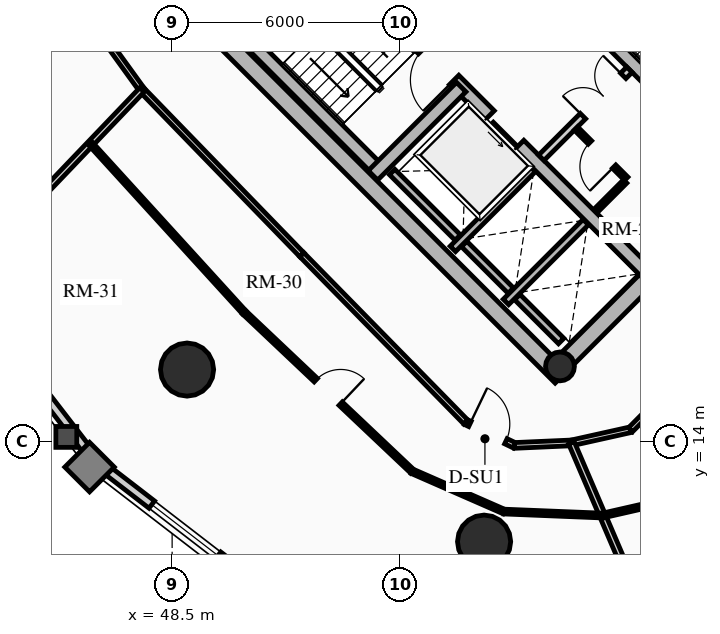
"""IFC4 building model, lengths in metres.
Left out: names, types, materials, properties, quantities, classifications, styles, units other than length and angle.
Written with IfcOpenShell. Run it as: python <this file> out.ifc"""

import sys

from ifc_helpers import new_model, si_unit, direction, frame, frame_2d, origin, origin_2d, place, context, subcontext, project, spatial, rectangle, circle, hollow_circle, extrude, source, transform, mapped, element, fill, save


model = new_model("IFC4")
c1 = context("Model", 3, precision=1e-05, world=origin(), true_north=direction((0.0, 1.0)))
c2 = subcontext(c1, "Body", "Model", "MODEL_VIEW")
j1 = project(units=[si_unit("LENGTHUNIT", "METRE"), si_unit("PLANEANGLEUNIT", "RADIAN")], contexts=[c1])
p1 = place(None, origin())
s1 = spatial("IfcSite", under=j1, at=p1, CompositionType="ELEMENT")
p2 = place(p1, origin())
s2 = spatial("IfcBuilding", under=s1, at=p2, CompositionType="ELEMENT")
p3 = place(p2, frame((0.0, 0.0, 110.89)))
s3 = spatial("IfcBuildingStorey", under=s2, at=p3, CompositionType="ELEMENT", Elevation=110.89)
for number, where, z_axis, x_axis in (
    (1, (58.737, 15.697, 0.0), (0.0, 0.0, 1.0), (-0.707, 0.707, 0.0)),
    (2, (66.303, 23.263, 0.0), (0.0, 0.0, 1.0), (-0.707, 0.707, 0.0)),
):
    element("IfcWall", number, at=place(p3, frame(where, z_axis=z_axis, x_axis=x_axis)), inside=s3, PredefinedType="SHEAR", context=c2, shape_type="SweptSolid", body=[
        extrude(rectangle(XDim=14.2, YDim=0.45, at=frame_2d((7.1, 0.0))), origin(), (0.0, 0.0, 1.0), 2.91),
    ])
p4 = place(p3, frame((58.578, 15.856, 0.0), z_axis=(0.0, 0.0, 1.0), x_axis=(0.707106781187, 0.707106781187, 0.0)))
e3 = element("IfcWall", 3, at=p4, inside=s3, PredefinedType="SHEAR", context=c2, shape_type="SweptSolid", body=[
    extrude(rectangle(XDim=10.7, YDim=0.45, at=frame_2d((5.35, 0.0))), origin(), (0.0, 0.0, 1.0), 2.91),
])
m1 = source(origin(), c2, "Body", "SweptSolid", [
    extrude(rectangle(XDim=1.5, YDim=2.02, at=frame_2d((0.75, 1.01))), frame((0.0, 0.235, 0.0), z_axis=(0.0, -1.0, 0.0), x_axis=(1.0, 0.0, 0.0)), (0.0, 0.0, 1.0), 0.47),
])
p5 = place(p4, frame((5.45, 0.0, 0.0)))
e4 = element("IfcOpeningElement", 4, at=p5, cuts=e3, PredefinedType="OPENING", context=c2, shape_type="MappedRepresentation", body=[
    mapped(m1, transform((0.0, 0.0, 0.0), x_axis=(1.0, 0.0, 0.0), y_axis=(0.0, 1.0, 0.0), z_axis=(0.0, 0.0, 1.0), scale=1.0)),
])
p6 = place(p3, frame((61.078, 18.355, 0.0), z_axis=(0.0, 0.0, 1.0), x_axis=(-0.707106781187, 0.707106781187, 0.0)))
e5 = element("IfcWall", 5, at=p6, inside=s3, PredefinedType="SHEAR", context=c2, shape_type="SweptSolid", body=[
    extrude(rectangle(XDim=13.75, YDim=0.35, at=frame_2d((6.875, 0.0))), origin(), (0.0, 0.0, 1.0), 2.91),
])
m2 = source(origin(), c2, "Body", "SweptSolid", [
    extrude(rectangle(XDim=1.1, YDim=2.015, at=frame_2d((0.55, 1.007))), frame((0.0, 0.185, 0.0), z_axis=(0.0, -1.0, 0.0), x_axis=(1.0, 0.0, 0.0)), (0.0, 0.0, 1.0), 0.37),
])
p7 = place(p6, frame((4.875, 0.0, 0.0)))
e6 = element("IfcOpeningElement", 6, at=p7, cuts=e5, PredefinedType="OPENING", context=c2, shape_type="MappedRepresentation", body=[
    mapped(m2, transform((0.0, 0.0, 0.0), x_axis=(1.0, 0.0, 0.0), y_axis=(0.0, 1.0, 0.0), z_axis=(0.0, 0.0, 1.0), scale=1.0)),
])
m3 = source(origin(), c2, "Body", "SweptSolid", [
    extrude(rectangle(XDim=1.15, YDim=2.02, at=frame_2d((0.575, 1.01))), frame((0.0, 0.185, 0.0), z_axis=(0.0, -1.0, 0.0), x_axis=(1.0, 0.0, 0.0)), (0.0, 0.0, 1.0), 0.37),
])
p8 = place(p6, frame((7.295, 0.0, 0.0)))
e7 = element("IfcOpeningElement", 7, at=p8, cuts=e5, PredefinedType="OPENING", context=c2, shape_type="MappedRepresentation", body=[
    mapped(m3, transform((0.0, 0.0, 0.0), x_axis=(1.0, 0.0, 0.0), y_axis=(0.0, 1.0, 0.0), z_axis=(0.0, 0.0, 1.0), scale=1.0)),
])
p9 = place(p3, frame((63.645, 20.922, 0.0), z_axis=(0.0, 0.0, 1.0), x_axis=(-0.707106781187, 0.707106781187, 0.0)))
e8 = element("IfcWall", 8, at=p9, inside=s3, PredefinedType="SHEAR", context=c2, shape_type="SweptSolid", body=[
    extrude(rectangle(XDim=13.75, YDim=0.35, at=frame_2d((6.875, 0.0))), origin(), (0.0, 0.0, 1.0), 2.91),
])
p10 = place(p9, frame((10.0, 0.0, 0.0)))
e9 = element("IfcOpeningElement", 9, at=p10, cuts=e8, PredefinedType="OPENING", context=c2, shape_type="MappedRepresentation", body=[
    mapped(m2, transform((0.0, 0.0, 0.0), x_axis=(1.0, 0.0, 0.0), y_axis=(0.0, 1.0, 0.0), z_axis=(0.0, 0.0, 1.0), scale=1.0)),
])
p11 = place(p9, frame((12.0, 0.0, 0.0)))
e10 = element("IfcOpeningElement", 10, at=p11, cuts=e8, PredefinedType="OPENING", context=c2, shape_type="MappedRepresentation", body=[
    mapped(m2, transform((0.0, 0.0, 0.0), x_axis=(1.0, 0.0, 0.0), y_axis=(0.0, 1.0, 0.0), z_axis=(0.0, 0.0, 1.0), scale=1.0)),
])
p12 = place(p9, frame((5.305, 0.0, 0.0)))
e11 = element("IfcOpeningElement", 11, at=p12, cuts=e8, PredefinedType="OPENING", context=c2, shape_type="MappedRepresentation", body=[
    mapped(m3, transform((0.0, 0.0, 0.0), x_axis=(1.0, 0.0, 0.0), y_axis=(0.0, 1.0, 0.0), z_axis=(0.0, 0.0, 1.0), scale=1.0)),
])
p13 = place(p3, frame((53.922, 21.141, 0.0), z_axis=(0.0, 0.0, 1.0), x_axis=(-0.707088616009, 0.707124945897, 0.0)))
e12 = element("IfcWall", 12, at=p13, inside=s3, PredefinedType="SHEAR", context=c2, shape_type="SweptSolid", body=[
    extrude(rectangle(XDim=6.72, YDim=0.35, at=frame_2d((3.36, 0.0))), origin(), (0.0, 0.0, 1.0), 2.91),
])
p14 = place(p3, frame((53.784, 21.003, 0.0), z_axis=(0.0, 0.0, 1.0), x_axis=(0.707106781187, 0.707106781187, 0.0)))
e13 = element("IfcWall", 13, at=p14, inside=s3, PredefinedType="SHEAR", context=c2, shape_type="SweptSolid", body=[
    extrude(rectangle(XDim=3.285, YDim=0.35, at=frame_2d((1.643, 0.0))), origin(), (0.0, 0.0, 1.0), 2.91),
])
p15 = place(p3, frame((58.706, 15.976, 0.0), z_axis=(0.0, 0.0, 1.0), x_axis=(0.707106781187, 0.707106781187, 0.0)))
e14 = element("IfcColumn", 14, at=p15, inside=s3, PredefinedType="COLUMN", context=c2, shape_type="SweptSolid", body=[
    extrude(hollow_circle(Radius=0.38, WallThickness=0.032, at=origin_2d()), origin(), (0.0, 0.0, 1.0), 2.91),
])
for number, where, z_axis, x_axis in (
    (15, (48.893, 15.893, 0.0), (0.0, 0.0, 1.0), (1.0, 0.0, 0.0)),
    (16, (56.709, 11.365, 0.0), (0.0, 0.0, 1.0), (1.0, 0.0, 0.0)),
):
    element("IfcColumn", number, at=place(p3, frame(where, z_axis=z_axis, x_axis=x_axis)), inside=s3, PredefinedType="USERDEFINED", context=c2, shape_type="SweptSolid", body=[
        extrude(circle(Radius=0.7, at=origin_2d()), origin(), (0.0, 0.0, 1.0), 2.91),
    ])
p16 = place(p3, frame((46.483, 13.483, 0.0), z_axis=(0.0, 0.0, 1.0), x_axis=(-0.61054437102, 0.791982052206, 0.0)))
e17 = element("IfcWall", 17, at=p16, inside=s3, PredefinedType="SOLIDWALL", context=c2, shape_type="SweptSolid", body=[
    extrude(rectangle(XDim=5.942, YDim=0.24, at=frame_2d((2.971, 0.0))), origin(), (0.0, 0.0, 1.0), 2.179),
])
p17 = place(p3, frame((51.189, 9.855, 0.0), z_axis=(0.0, 0.0, 1.0), x_axis=(-0.791982052206, 0.61054437102, 0.0)))
e18 = element("IfcWall", 18, at=p17, inside=s3, PredefinedType="SOLIDWALL", context=c2, shape_type="SweptSolid", body=[
    extrude(rectangle(XDim=5.942, YDim=0.24, at=frame_2d((2.971, 0.0))), origin(), (0.0, 0.0, 1.0), 2.179),
])
m4 = source(origin(), c2, "Body", "SweptSolid", [
    extrude(rectangle(XDim=2.2, YDim=1.35, at=frame_2d((1.1, 0.675))), frame((0.0, 0.13, 0.0), z_axis=(0.0, -1.0, 0.0), x_axis=(1.0, 0.0, 0.0)), (0.0, 0.0, 1.0), 0.26),
])
p18 = place(p17, frame((1.871, 0.0, 0.65)))
e19 = element("IfcOpeningElement", 19, at=p18, cuts=e18, PredefinedType="OPENING", context=c2, shape_type="MappedRepresentation", body=[
    mapped(m4, transform((0.0, 0.0, 0.0), x_axis=(1.0, 0.0, 0.0), y_axis=(0.0, 1.0, 0.0), z_axis=(0.0, 0.0, 1.0), scale=1.0)),
])
p19 = place(p3, frame((55.888, 19.069, 0.0), z_axis=(0.0, 0.0, 1.0), x_axis=(0.707106781187, 0.707106781187, 0.0)))
e20 = element("IfcWall", 20, at=p19, inside=s3, PredefinedType="SHEAR", context=c2, shape_type="SweptSolid", body=[
    extrude(rectangle(XDim=2.97, YDim=0.2, at=frame_2d((1.485, 0.0))), origin(), (0.0, 0.0, 1.0), 2.91),
])
p20 = place(p3, frame((56.015, 19.366, 0.0), z_axis=(0.0, 0.0, 1.0), x_axis=(-0.707106781187, 0.707106781187, 0.0)))
e21 = element("IfcWall", 21, at=p20, inside=s3, PredefinedType="SHEAR", context=c2, shape_type="SweptSolid", body=[
    extrude(rectangle(XDim=2.44, YDim=0.2, at=frame_2d((1.22, 0.0))), origin(), (0.0, 0.0, 1.0), 2.91),
])
p21 = place(p3, frame((57.284, 17.673, 0.0), z_axis=(0.0, 0.0, 1.0), x_axis=(0.707147878904, 0.70706568108, 0.0)))
e22 = element("IfcWall", 22, at=p21, inside=s3, PredefinedType="SHEAR", context=c2, shape_type="SweptSolid", body=[
    extrude(rectangle(XDim=2.97, YDim=0.2, at=frame_2d((1.485, 0.0))), origin(), (0.0, 0.0, 1.0), 2.91),
])
p22 = place(p3, frame((57.412, 17.97, 0.0), z_axis=(0.0, 0.0, 1.0), x_axis=(-0.707106781187, 0.707106781187, 0.0)))
e23 = element("IfcWall", 23, at=p22, inside=s3, PredefinedType="SHEAR", context=c2, shape_type="SweptSolid", body=[
    extrude(rectangle(XDim=1.735, YDim=0.2, at=frame_2d((0.867, 0.0))), origin(), (0.0, 0.0, 1.0), 2.91),
])
p23 = place(p3, frame((58.737, 16.644, 0.0), z_axis=(0.0, 0.0, 1.0), x_axis=(-0.707032117043, 0.707181437447, 0.0)))
e24 = element("IfcWall", 24, at=p23, inside=s3, PredefinedType="SHEAR", context=c2, shape_type="SweptSolid", body=[
    extrude(rectangle(XDim=1.635, YDim=0.2, at=frame_2d((0.817, 0.0))), origin(), (0.0, 0.0, 1.0), 2.91),
])
p24 = place(p3, frame((58.214, 21.467, 0.0), z_axis=(0.0, 0.0, 1.0), x_axis=(0.707106781187, 0.707106781187, 0.0)))
e25 = element("IfcWall", 25, at=p24, inside=s3, PredefinedType="PARTITIONING", context=c2, shape_type="SweptSolid", body=[
    extrude(rectangle(XDim=3.28, YDim=0.2, at=frame_2d((1.64, 0.0))), origin(), (0.0, 0.0, 1.0), 2.655),
])
m5 = source(origin(), c2, "Body", "SweptSolid", [
    extrude(rectangle(XDim=1.5, YDim=2.02, at=frame_2d((0.75, 1.01))), frame((0.0, 0.11, 0.0), z_axis=(0.0, -1.0, 0.0), x_axis=(1.0, 0.0, 0.0)), (0.0, 0.0, 1.0), 0.22),
])
p25 = place(p24, frame((1.55, 0.0, 0.0)))
e26 = element("IfcOpeningElement", 26, at=p25, cuts=e25, PredefinedType="OPENING", context=c2, shape_type="MappedRepresentation", body=[
    mapped(m5, transform((0.0, 0.0, 0.0), x_axis=(1.0, 0.0, 0.0), y_axis=(0.0, 1.0, 0.0), z_axis=(0.0, 0.0, 1.0), scale=1.0)),
])
p26 = place(p3, frame((60.448, 20.915, 0.0), z_axis=(0.0, 0.0, 1.0), x_axis=(-0.707106781187, 0.707106781187, 0.0)))
e27 = element("IfcWall", 27, at=p26, inside=s3, PredefinedType="PARTITIONING", context=c2, shape_type="SweptSolid", body=[
    extrude(rectangle(XDim=1.87, YDim=0.125, at=frame_2d((0.935, 0.0))), origin(), (0.0, 0.0, 1.0), 2.655),
])
m6 = source(origin(), c2, "Body", "SweptSolid", [
    extrude(rectangle(XDim=0.9, YDim=2.005, at=frame_2d((0.45, 1.002))), frame((0.0, 0.073, 0.0), z_axis=(0.0, -1.0, 0.0), x_axis=(1.0, 0.0, 0.0)), (0.0, 0.0, 1.0), 0.145),
])
p27 = place(p26, frame((0.45, 0.0, 0.0)))
e28 = element("IfcOpeningElement", 28, at=p27, cuts=e27, PredefinedType="OPENING", context=c2, shape_type="MappedRepresentation", body=[
    mapped(m6, transform((0.0, 0.0, 0.0), x_axis=(1.0, 0.0, 0.0), y_axis=(0.0, 1.0, 0.0), z_axis=(0.0, 0.0, 1.0), scale=1.0)),
])
p28 = place(p3, frame((59.643, 20.066, 0.0), z_axis=(0.0, 0.0, 1.0), x_axis=(0.707106781187, 0.707106781187, 0.0)))
e29 = element("IfcWall", 29, at=p28, inside=s3, PredefinedType="PARTITIONING", context=c2, shape_type="SweptSolid", body=[
    extrude(rectangle(XDim=1.1, YDim=0.125, at=frame_2d((0.55, 0.0))), origin(), (0.0, 0.0, 1.0), 2.655),
])
p29 = place(p3, frame((46.795, 24.513, 0.0), z_axis=(0.0, 0.0, 1.0), x_axis=(0.585628197524, -0.810579801294, 0.0)))
e30 = element("IfcWall", 30, at=p29, inside=s3, PredefinedType="PARTITIONING", context=c2, shape_type="SweptSolid", body=[
    extrude(rectangle(XDim=1.554, YDim=0.15, at=frame_2d((0.777, 0.0))), origin(), (0.0, 0.0, 1.0), 2.225),
])
p30 = place(p3, frame((47.706, 23.253, 0.0), z_axis=(0.0, 0.0, 1.0), x_axis=(0.696179266346, -0.717867974707, 0.0)))
e31 = element("IfcWall", 31, at=p30, inside=s3, PredefinedType="PARTITIONING", context=c2, shape_type="SweptSolid", body=[
    extrude(rectangle(XDim=6.045, YDim=0.15, at=frame_2d((3.022, 0.0))), origin(), (0.0, 0.0, 1.0), 2.655),
])
p31 = place(p3, frame((51.914, 18.914, 0.0), z_axis=(0.0, 0.0, 1.0), x_axis=(0.699999313799, -0.714143515465, 0.0)))
e32 = element("IfcWall", 32, at=p31, inside=s3, PredefinedType="PARTITIONING", context=c2, shape_type="SweptSolid", body=[
    extrude(rectangle(XDim=6.162, YDim=0.15, at=frame_2d((3.081, 0.0))), origin(), (0.0, 0.0, 1.0), 2.225),
])
p32 = place(p3, frame((56.227, 14.513, 0.0), z_axis=(0.0, 0.0, 1.0), x_axis=(0.901477579283, -0.432825801044, 0.0)))
e33 = element("IfcWall", 33, at=p32, inside=s3, PredefinedType="PARTITIONING", context=c2, shape_type="SweptSolid", body=[
    extrude(rectangle(XDim=1.424, YDim=0.15, at=frame_2d((0.712, 0.0))), origin(), (0.0, 0.0, 1.0), 2.225),
])
m7 = source(origin(), c2, "Body", "SweptSolid", [
    extrude(rectangle(XDim=1.05, YDim=2.015, at=frame_2d((0.525, 1.007))), frame((0.0, 0.085, 0.0), z_axis=(0.0, -1.0, 0.0), x_axis=(1.0, 0.0, 0.0)), (0.0, 0.0, 1.0), 0.17),
])
p33 = place(p32, frame((0.12, 0.0, 0.0)))
e34 = element("IfcOpeningElement", 34, at=p33, cuts=e33, PredefinedType="OPENING", context=c2, shape_type="MappedRepresentation", body=[
    mapped(m7, transform((0.0, 0.0, 0.0), x_axis=(1.0, 0.0, 0.0), y_axis=(0.0, 1.0, 0.0), z_axis=(0.0, 0.0, 1.0), scale=1.0)),
])
p34 = place(p3, frame((57.511, 13.897, 0.0), z_axis=(0.0, 0.0, 1.0), x_axis=(0.999024538494, 0.044158481476, 0.0)))
e35 = element("IfcWall", 35, at=p34, inside=s3, PredefinedType="PARTITIONING", context=c2, shape_type="SweptSolid", body=[
    extrude(rectangle(XDim=1.498, YDim=0.15, at=frame_2d((0.749, 0.0))), origin(), (0.0, 0.0, 1.0), 2.225),
])
p35 = place(p3, frame((59.008, 13.963, 0.0), z_axis=(0.0, 0.0, 1.0), x_axis=(0.976020856791, 0.21767702476, 0.0)))
e36 = element("IfcWall", 36, at=p35, inside=s3, PredefinedType="PARTITIONING", context=c2, shape_type="SweptSolid", body=[
    extrude(rectangle(XDim=1.593, YDim=0.15, at=frame_2d((0.796, 0.0))), origin(), (0.0, 0.0, 1.0), 2.225),
])
p36 = place(p3, frame((60.562, 14.31, 0.0), z_axis=(0.0, 0.0, 1.0), x_axis=(0.704566236161, 0.709638230975, 0.0)))
e37 = element("IfcWall", 37, at=p36, inside=s3, PredefinedType="PARTITIONING", context=c2, shape_type="SweptSolid", body=[
    extrude(rectangle(XDim=3.321, YDim=0.15, at=frame_2d((1.661, 0.0))), origin(), (0.0, 0.0, 1.0), 2.225),
])
p37 = place(p3, frame((47.706, 23.253, 0.0), z_axis=(0.0, 0.0, 1.0), x_axis=(-0.691027649154, -0.722828325472, 0.0)))
e38 = element("IfcWall", 38, at=p37, inside=s3, PredefinedType="PARTITIONING", context=c2, shape_type="SweptSolid", body=[
    extrude(rectangle(XDim=6.994, YDim=0.16, at=frame_2d((3.497, 0.0))), origin(), (0.0, 0.0, 1.0), 2.179),
])
p38 = place(p3, frame((59.008, 13.963, 0.0), z_axis=(0.0, 0.0, 1.0), x_axis=(0.393439207333, -0.919350635032, 0.0)))
e39 = element("IfcWall", 39, at=p38, inside=s3, PredefinedType="PARTITIONING", context=c2, shape_type="SweptSolid", body=[
    extrude(rectangle(XDim=7.427, YDim=0.16, at=frame_2d((3.713, 0.0))), origin(), (0.0, 0.0, 1.0), 2.179),
])
p39 = place(p3, frame((46.352, 21.838, 0.0), z_axis=(0.0, 0.0, 1.0), x_axis=(0.673416949194, -0.739262884594, 0.0)))
e40 = element("IfcWall", 40, at=p39, inside=s3, PredefinedType="PARTITIONING", context=c2, shape_type="SweptSolid", body=[
    extrude(rectangle(XDim=6.007, YDim=0.125, at=frame_2d((3.003, 0.0))), origin(), (0.0, 0.0, 1.0), 2.655),
])
p40 = place(p3, frame((50.397, 17.397, 0.0), z_axis=(0.0, 0.0, 1.0), x_axis=(0.726427828833, -0.687242758781, 0.0)))
e41 = element("IfcWall", 41, at=p40, inside=s3, PredefinedType="PARTITIONING", context=c2, shape_type="SweptSolid", body=[
    extrude(rectangle(XDim=6.087, YDim=0.125, at=frame_2d((3.043, 0.0))), origin(), (0.0, 0.0, 1.0), 2.225),
])
p41 = place(p40, frame((2.594, 0.0, 0.0)))
e42 = element("IfcOpeningElement", 42, at=p41, cuts=e41, PredefinedType="OPENING", context=c2, shape_type="MappedRepresentation", body=[
    mapped(m6, transform((0.0, 0.0, 0.0), x_axis=(1.0, 0.0, 0.0), y_axis=(0.0, 1.0, 0.0), z_axis=(0.0, 0.0, 1.0), scale=1.0)),
])
p42 = place(p3, frame((54.819, 13.214, 0.0), z_axis=(0.0, 0.0, 1.0), x_axis=(0.915889218912, -0.401431113245, 0.0)))
e43 = element("IfcWall", 43, at=p42, inside=s3, PredefinedType="PARTITIONING", context=c2, shape_type="SweptSolid", body=[
    extrude(rectangle(XDim=2.635, YDim=0.125, at=frame_2d((1.318, 0.0))), origin(), (0.0, 0.0, 1.0), 2.225),
])
p43 = place(p3, frame((57.233, 12.156, 0.0), z_axis=(0.0, 0.0, 1.0), x_axis=(0.999181916557, -0.040441286156, 0.0)))
e44 = element("IfcWall", 44, at=p43, inside=s3, PredefinedType="PARTITIONING", context=c2, shape_type="SweptSolid", body=[
    extrude(rectangle(XDim=2.596, YDim=0.125, at=frame_2d((1.298, 0.0))), origin(), (0.0, 0.0, 1.0), 2.655),
])
p44 = place(p3, frame((59.826, 12.051, 0.0), z_axis=(0.0, 0.0, 1.0), x_axis=(0.975009915085, 0.222161350116, 0.0)))
e45 = element("IfcWall", 45, at=p44, inside=s3, PredefinedType="PARTITIONING", context=c2, shape_type="SweptSolid", body=[
    extrude(rectangle(XDim=2.578, YDim=0.125, at=frame_2d((1.289, 0.0))), origin(), (0.0, 0.0, 1.0), 2.225),
])
m8 = source(origin(), c2, "Body", "SweptSolid", [
    extrude(rectangle(XDim=2.2, YDim=1.35, at=frame_2d((1.1, 0.675))), frame((0.0, 0.03, 0.0), z_axis=(0.0, -1.0, 0.0), x_axis=(1.0, 0.0, 0.0)), (0.0, 0.0, 1.0), 0.06),
])
p45 = place(p18, origin())
e46 = element("IfcWindow", 46, at=p45, inside=s3, PartitioningType="DOUBLE_PANEL_VERTICAL", PredefinedType="WINDOW", context=c2, shape_type="MappedRepresentation", body=[
    mapped(m8, transform((0.0, 0.0, 0.0), x_axis=(1.0, 0.0, 0.0), y_axis=(0.0, 1.0, 0.0), z_axis=(0.0, 0.0, 1.0), scale=1.0)),
])
fill(e19, e46)
m9 = source(origin(), c2, "Body", "SweptSolid", [
    extrude(rectangle(XDim=1.1, YDim=2.015, at=frame_2d((0.55, 1.007))), frame((0.0, 0.025, 0.0), z_axis=(0.0, -1.0, 0.0), x_axis=(1.0, 0.0, 0.0)), (0.0, 0.0, 1.0), 0.05),
])
p46 = place(p7, origin())
e47 = element("IfcDoor", 47, at=p46, inside=s3, OperationType="SLIDING_TO_LEFT", PredefinedType="DOOR", context=c2, shape_type="MappedRepresentation", body=[
    mapped(m9, transform((0.0, 0.0, 0.0), x_axis=(1.0, 0.0, 0.0), y_axis=(0.0, 1.0, 0.0), z_axis=(0.0, 0.0, 1.0), scale=1.0)),
])
fill(e6, e47)
m10 = source(origin(), c2, "Body", "SweptSolid", [
    extrude(rectangle(XDim=1.15, YDim=2.02, at=frame_2d((0.575, 1.01))), frame((0.0, 0.025, 0.0), z_axis=(0.0, -1.0, 0.0), x_axis=(1.0, 0.0, 0.0)), (0.0, 0.0, 1.0), 0.05),
])
p47 = place(p8, origin())
e48 = element("IfcDoor", 48, at=p47, inside=s3, OperationType="SINGLE_SWING_LEFT", PredefinedType="DOOR", context=c2, shape_type="MappedRepresentation", body=[
    mapped(m10, transform((0.0, 0.0, 0.0), x_axis=(1.0, 0.0, 0.0), y_axis=(0.0, 1.0, 0.0), z_axis=(0.0, 0.0, 1.0), scale=1.0)),
])
fill(e7, e48)
m11 = source(origin(), c2, "Body", "SweptSolid", [
    extrude(rectangle(XDim=1.5, YDim=2.02, at=frame_2d((0.75, 1.01))), frame((0.0, 0.025, 0.0), z_axis=(0.0, -1.0, 0.0), x_axis=(1.0, 0.0, 0.0)), (0.0, 0.0, 1.0), 0.05),
])
p48 = place(p25, origin())
e49 = element("IfcDoor", 49, at=p48, inside=s3, OperationType="DOUBLE_DOOR_SINGLE_SWING", PredefinedType="DOOR", context=c2, shape_type="MappedRepresentation", body=[
    mapped(m11, transform((0.0, 0.0, 0.0), x_axis=(1.0, 0.0, 0.0), y_axis=(0.0, 1.0, 0.0), z_axis=(0.0, 0.0, 1.0), scale=1.0)),
])
fill(e26, e49)
m12 = source(origin(), c2, "Body", "SweptSolid", [
    extrude(rectangle(XDim=0.9, YDim=2.005, at=frame_2d((0.45, 1.002))), frame((0.0, 0.025, 0.0), z_axis=(0.0, -1.0, 0.0), x_axis=(1.0, 0.0, 0.0)), (0.0, 0.0, 1.0), 0.05),
])
p49 = place(p27, origin())
e50 = element("IfcDoor", 50, at=p49, inside=s3, OperationType="SINGLE_SWING_LEFT", PredefinedType="DOOR", context=c2, shape_type="MappedRepresentation", body=[
    mapped(m12, transform((0.0, 0.0, 0.0), x_axis=(1.0, 0.0, 0.0), y_axis=(0.0, 1.0, 0.0), z_axis=(0.0, 0.0, 1.0), scale=1.0)),
])
fill(e28, e50)
m13 = source(origin(), c2, "Body", "SweptSolid", [
    extrude(rectangle(XDim=1.05, YDim=2.015, at=frame_2d((0.525, 1.007))), frame((0.0, 0.025, 0.0), z_axis=(0.0, -1.0, 0.0), x_axis=(1.0, 0.0, 0.0)), (0.0, 0.0, 1.0), 0.05),
])
p50 = place(p33, origin())
e51 = element("IfcDoor", 51, at=p50, inside=s3, OperationType="SINGLE_SWING_LEFT", PredefinedType="DOOR", context=c2, shape_type="MappedRepresentation", body=[
    mapped(m13, transform((0.0, 0.0, 0.0), x_axis=(1.0, 0.0, 0.0), y_axis=(0.0, 1.0, 0.0), z_axis=(0.0, 0.0, 1.0), scale=1.0)),
])
fill(e34, e51)
p51 = place(p41, origin())
e52 = element("IfcDoor", 52, at=p51, inside=s3, OperationType="SINGLE_SWING_RIGHT", PredefinedType="DOOR", context=c2, shape_type="MappedRepresentation", body=[
    mapped(m12, transform((0.0, 0.0, 0.0), x_axis=(1.0, 0.0, 0.0), y_axis=(0.0, 1.0, 0.0), z_axis=(0.0, 0.0, 1.0), scale=1.0)),
])
fill(e42, e52)
save(model, sys.argv[1])
